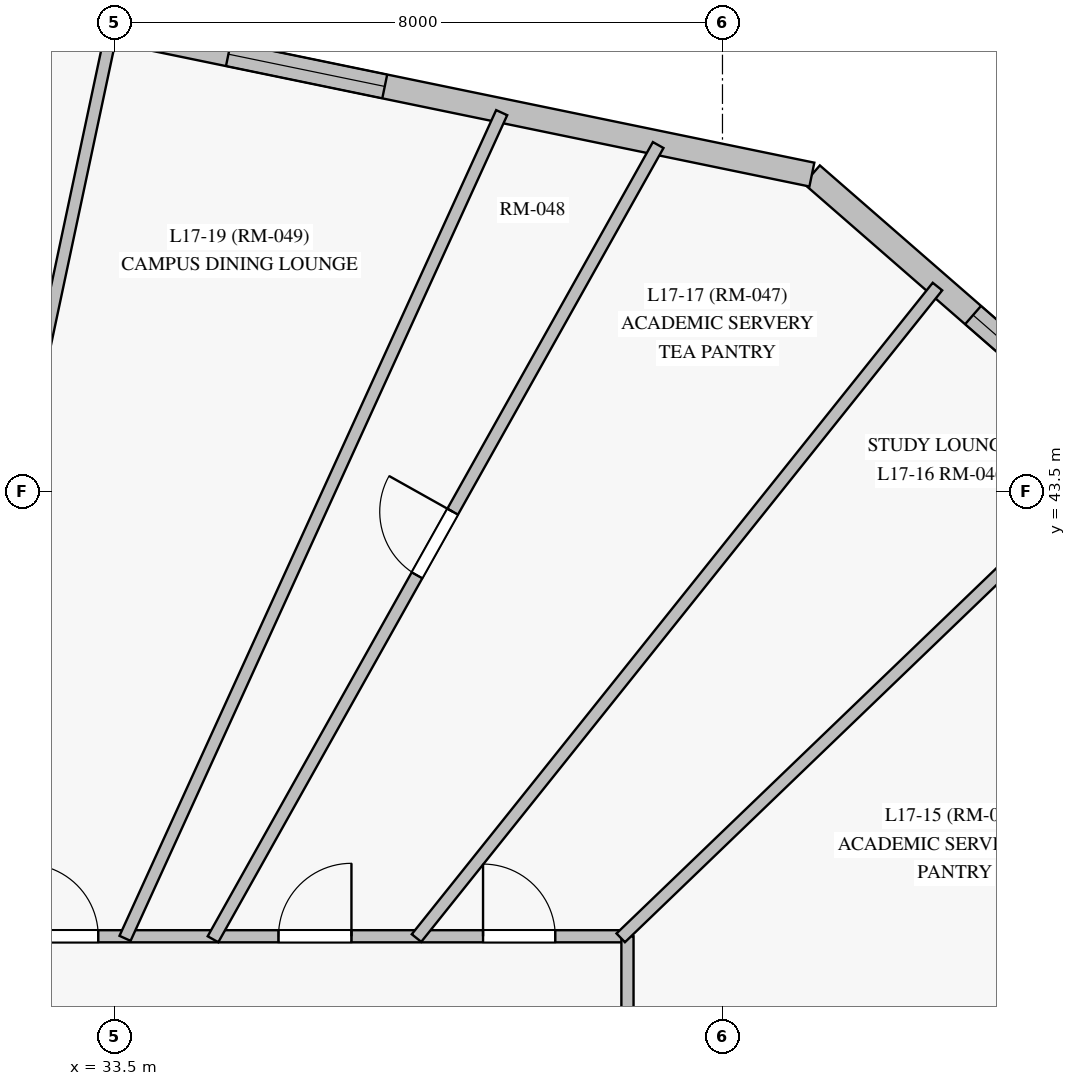
"""IFC4 building model, lengths in metres.
Left out: names, types, materials, properties, quantities, classifications, styles, units other than length and angle.
Written with IfcOpenShell. Run it as: python <this file> out.ifc"""

import sys

from ifc_helpers import new_model, si_unit, direction, frame, frame_2d, origin, origin_with_axes, place, context, subcontext, project, spatial, rectangle, extrude, source, transform, mapped, element, fill, save


model = new_model("IFC4")
c1 = context("Model", 3, precision=1e-05, world=origin(), true_north=direction((0.0, 1.0)))
c2 = subcontext(c1, "Body", "Model", "MODEL_VIEW")
j1 = project(units=[si_unit("LENGTHUNIT", "METRE"), si_unit("PLANEANGLEUNIT", "RADIAN")], contexts=[c1])
p1 = place(None, origin())
s1 = spatial("IfcSite", under=j1, at=p1, CompositionType="ELEMENT")
p2 = place(p1, origin())
s2 = spatial("IfcBuilding", under=s1, at=p2, CompositionType="ELEMENT")
p3 = place(p2, frame((0.0, 0.0, 66.1)))
s3 = spatial("IfcBuildingStorey", under=s2, at=p3, CompositionType="ELEMENT", Elevation=66.1)
p4 = place(p3, frame((48.243, 42.82, 0.0), z_axis=(0.0, 0.0, 1.0), x_axis=(-0.753916755465, 0.656969958087, 0.0)))
e1 = element("IfcWall", 1, at=p4, inside=s3, PredefinedType="SOLIDWALL", context=c2, shape_type="SweptSolid", body=[
    extrude(rectangle(XDim=7.384, YDim=0.32, at=frame_2d((3.692, 0.0))), origin(), (0.0, 0.0, 1.0), 3.02),
])
p5 = place(p4, frame((2.47, 0.0, 0.85)))
e2 = element("IfcOpeningElement", 2, at=p5, cuts=e1, PredefinedType="OPENING", context=c2, shape_type="SweptSolid", body=[
    extrude(rectangle(XDim=2.1, YDim=1.95, at=frame_2d((1.05, 0.975))), frame((0.0, 0.17, 0.0), z_axis=(0.0, -1.0, 0.0), x_axis=(1.0, 0.0, 0.0)), (0.0, 0.0, 1.0), 0.34),
])
p6 = place(p3, frame((42.676, 47.671, 0.0), z_axis=(0.0, 0.0, 1.0), x_axis=(-0.979362200274, 0.20211303935, 0.0)))
e3 = element("IfcWall", 3, at=p6, inside=s3, PredefinedType="SOLIDWALL", context=c2, shape_type="SweptSolid", body=[
    extrude(rectangle(XDim=10.195, YDim=0.32, at=frame_2d((5.098, 0.0))), origin(), (0.0, 0.0, 1.0), 3.35),
])
p7 = place(p6, frame((5.738, 0.0, 0.85)))
e4 = element("IfcOpeningElement", 4, at=p7, cuts=e3, PredefinedType="OPENING", context=c2, shape_type="SweptSolid", body=[
    extrude(rectangle(XDim=2.1, YDim=1.95, at=frame_2d((1.05, 0.975))), frame((0.0, 0.17, 0.0), z_axis=(0.0, -1.0, 0.0), x_axis=(1.0, 0.0, 0.0)), (0.0, 0.0, 1.0), 0.34),
])
p8 = place(p3, frame((32.691, 49.731, 0.0), z_axis=(0.0, 0.0, 1.0), x_axis=(-0.973494178879, -0.228711791759, 0.0)))
e5 = element("IfcWall", 5, at=p8, inside=s3, PredefinedType="SOLIDWALL", context=c2, shape_type="SweptSolid", body=[
    extrude(rectangle(XDim=14.791, YDim=0.32, at=frame_2d((7.396, 0.0))), origin(), (0.0, 0.0, 1.0), 3.35),
])
p9 = place(p8, frame((2.057, 0.0, 0.85)))
e6 = element("IfcOpeningElement", 6, at=p9, cuts=e5, PredefinedType="OPENING", context=c2, shape_type="SweptSolid", body=[
    extrude(rectangle(XDim=2.1, YDim=1.95, at=frame_2d((1.05, 0.975))), frame((0.0, 0.17, 0.0), z_axis=(0.0, -1.0, 0.0), x_axis=(1.0, 0.0, 0.0)), (0.0, 0.0, 1.0), 0.34),
])
p10 = place(p8, frame((7.215, 0.0, 0.85)))
e7 = element("IfcOpeningElement", 7, at=p10, cuts=e5, PredefinedType="OPENING", context=c2, shape_type="SweptSolid", body=[
    extrude(rectangle(XDim=2.1, YDim=1.95, at=frame_2d((1.05, 0.975))), frame((0.0, 0.17, 0.0), z_axis=(0.0, -1.0, 0.0), x_axis=(1.0, 0.0, 0.0)), (0.0, 0.0, 1.0), 0.34),
])
p11 = place(p8, frame((11.26, 0.0, 0.85)))
e8 = element("IfcOpeningElement", 8, at=p11, cuts=e5, PredefinedType="OPENING", context=c2, shape_type="SweptSolid", body=[
    extrude(rectangle(XDim=2.1, YDim=1.95, at=frame_2d((1.05, 0.975))), frame((0.0, 0.17, 0.0), z_axis=(0.0, -1.0, 0.0), x_axis=(1.0, 0.0, 0.0)), (0.0, 0.0, 1.0), 0.34),
])
p12 = place(p3, frame((10.5, 37.65, 0.0), z_axis=(0.0, 0.0, 1.0), x_axis=(1.0, 0.0, 0.0)))
e9 = element("IfcWall", 9, at=p12, inside=s3, PredefinedType="PARTITIONING", context=c2, shape_type="SweptSolid", body=[
    extrude(rectangle(XDim=29.75, YDim=0.16, at=frame_2d((14.875, 0.0))), origin(), (0.0, 0.0, 1.0), 2.75),
])
p13 = place(p12, frame((27.85, 0.0, 0.0)))
e10 = element("IfcOpeningElement", 10, at=p13, cuts=e9, PredefinedType="OPENING", context=c2, shape_type="SweptSolid", body=[
    extrude(rectangle(XDim=0.95, YDim=2.15, at=frame_2d((0.475, 1.075))), frame((0.0, 0.09, 0.0), z_axis=(0.0, -1.0, 0.0), x_axis=(1.0, 0.0, 0.0)), (0.0, 0.0, 1.0), 0.18),
])
p14 = place(p12, frame((25.159, 0.0, 0.0)))
e11 = element("IfcOpeningElement", 11, at=p14, cuts=e9, PredefinedType="OPENING", context=c2, shape_type="SweptSolid", body=[
    extrude(rectangle(XDim=0.96, YDim=2.15, at=frame_2d((0.48, 1.075))), frame((0.0, 0.09, 0.0), z_axis=(0.0, -1.0, 0.0), x_axis=(1.0, 0.0, 0.0)), (0.0, 0.0, 1.0), 0.18),
])
p15 = place(p12, frame((21.837, 0.0, 0.0)))
e12 = element("IfcOpeningElement", 12, at=p15, cuts=e9, PredefinedType="OPENING", context=c2, shape_type="SweptSolid", body=[
    extrude(rectangle(XDim=0.95, YDim=2.15, at=frame_2d((0.475, 1.075))), frame((0.0, 0.09, 0.0), z_axis=(0.0, -1.0, 0.0), x_axis=(1.0, 0.0, 0.0)), (0.0, 0.0, 1.0), 0.18),
])
p16 = place(p12, frame((18.863, 0.0, 0.0)))
e13 = element("IfcOpeningElement", 13, at=p16, cuts=e9, PredefinedType="OPENING", context=c2, shape_type="SweptSolid", body=[
    extrude(rectangle(XDim=0.95, YDim=2.15, at=frame_2d((0.475, 1.075))), frame((0.0, 0.09, 0.0), z_axis=(0.0, -1.0, 0.0), x_axis=(1.0, 0.0, 0.0)), (0.0, 0.0, 1.0), 0.18),
])
p17 = place(p12, frame((15.14, 0.0, 0.0)))
e14 = element("IfcOpeningElement", 14, at=p17, cuts=e9, PredefinedType="OPENING", context=c2, shape_type="SweptSolid", body=[
    extrude(rectangle(XDim=0.96, YDim=2.15, at=frame_2d((0.48, 1.075))), frame((0.0, 0.09, 0.0), z_axis=(0.0, -1.0, 0.0), x_axis=(1.0, 0.0, 0.0)), (0.0, 0.0, 1.0), 0.18),
])
p18 = place(p12, frame((13.176, 0.0, 0.0)))
e15 = element("IfcOpeningElement", 15, at=p18, cuts=e9, PredefinedType="OPENING", context=c2, shape_type="SweptSolid", body=[
    extrude(rectangle(XDim=0.95, YDim=2.15, at=frame_2d((0.475, 1.075))), frame((0.0, 0.09, 0.0), z_axis=(0.0, -1.0, 0.0), x_axis=(1.0, 0.0, 0.0)), (0.0, 0.0, 1.0), 0.18),
])
p19 = place(p12, frame((9.938, 0.0, 0.0)))
e16 = element("IfcOpeningElement", 16, at=p19, cuts=e9, PredefinedType="OPENING", context=c2, shape_type="SweptSolid", body=[
    extrude(rectangle(XDim=0.95, YDim=2.15, at=frame_2d((0.475, 1.075))), frame((0.0, 0.09, 0.0), z_axis=(0.0, -1.0, 0.0), x_axis=(1.0, 0.0, 0.0)), (0.0, 0.0, 1.0), 0.18),
])
p20 = place(p3, frame((40.25, 37.65, 0.0), z_axis=(0.0, 0.0, 1.0), x_axis=(0.0, -1.0, 0.0)))
e17 = element("IfcWall", 17, at=p20, inside=s3, PredefinedType="PARTITIONING", context=c2, shape_type="SweptSolid", body=[
    extrude(rectangle(XDim=22.3, YDim=0.16, at=frame_2d((11.15, 0.0))), origin(), (0.0, 0.0, 1.0), 2.75),
])
p21 = place(p20, frame((14.02, 0.0, 0.0)))
e18 = element("IfcOpeningElement", 18, at=p21, cuts=e17, PredefinedType="OPENING", context=c2, shape_type="SweptSolid", body=[
    extrude(rectangle(XDim=0.95, YDim=2.15, at=frame_2d((0.475, 1.075))), frame((0.0, 0.09, 0.0), z_axis=(0.0, -1.0, 0.0), x_axis=(1.0, 0.0, 0.0)), (0.0, 0.0, 1.0), 0.18),
])
p22 = place(p20, frame((10.675, 0.0, 0.0)))
e19 = element("IfcOpeningElement", 19, at=p22, cuts=e17, PredefinedType="OPENING", context=c2, shape_type="SweptSolid", body=[
    extrude(rectangle(XDim=0.96, YDim=2.15, at=frame_2d((0.48, 1.075))), frame((0.0, 0.09, 0.0), z_axis=(0.0, -1.0, 0.0), x_axis=(1.0, 0.0, 0.0)), (0.0, 0.0, 1.0), 0.18),
])
p23 = place(p20, frame((7.04, 0.0, 0.0)))
e20 = element("IfcOpeningElement", 20, at=p23, cuts=e17, PredefinedType="OPENING", context=c2, shape_type="SweptSolid", body=[
    extrude(rectangle(XDim=0.95, YDim=2.15, at=frame_2d((0.475, 1.075))), frame((0.0, 0.09, 0.0), z_axis=(0.0, -1.0, 0.0), x_axis=(1.0, 0.0, 0.0)), (0.0, 0.0, 1.0), 0.18),
])
p24 = place(p20, frame((3.01, 0.0, 0.0)))
e21 = element("IfcOpeningElement", 21, at=p24, cuts=e17, PredefinedType="OPENING", context=c2, shape_type="SweptSolid", body=[
    extrude(rectangle(XDim=0.96, YDim=2.15, at=frame_2d((0.48, 1.075))), frame((0.0, 0.09, 0.0), z_axis=(0.0, -1.0, 0.0), x_axis=(1.0, 0.0, 0.0)), (0.0, 0.0, 1.0), 0.18),
])
p25 = place(p20, frame((1.651, 0.0, 0.0)))
e22 = element("IfcOpeningElement", 22, at=p25, cuts=e17, PredefinedType="OPENING", context=c2, shape_type="SweptSolid", body=[
    extrude(rectangle(XDim=0.96, YDim=2.15, at=frame_2d((0.48, 1.075))), frame((0.0, 0.09, 0.0), z_axis=(0.0, -1.0, 0.0), x_axis=(1.0, 0.0, 0.0)), (0.0, 0.0, 1.0), 0.18),
])
p26 = place(p3, frame((30.921, 37.606, 0.0), z_axis=(0.0, 0.0, 1.0), x_axis=(0.207881716817, 0.978153971424, 0.0)))
e23 = element("IfcWall", 23, at=p26, inside=s3, PredefinedType="PARTITIONING", context=c2, shape_type="SweptSolid", body=[
    extrude(rectangle(XDim=12.208, YDim=0.16, at=frame_2d((6.104, 0.0))), origin(), (0.0, 0.0, 1.0), 3.35),
])
p27 = place(p3, frame((34.797, 37.611, 0.0), z_axis=(0.0, 0.0, 1.0), x_axis=(0.488977567901, 0.872296359094, 0.0)))
e24 = element("IfcWall", 24, at=p27, inside=s3, PredefinedType="PARTITIONING", context=c2, shape_type="SweptSolid", body=[
    extrude(rectangle(XDim=11.979, YDim=0.16, at=frame_2d((5.989, 0.0))), origin(), (0.0, 0.0, 1.0), 3.35),
])
p28 = place(p27, frame((5.489, 0.0, 0.0)))
e25 = element("IfcOpeningElement", 25, at=p28, cuts=e24, PredefinedType="OPENING", context=c2, shape_type="SweptSolid", body=[
    extrude(rectangle(XDim=0.96, YDim=2.15, at=frame_2d((0.48, 1.075))), frame((0.0, 0.09, 0.0), z_axis=(0.0, -1.0, 0.0), x_axis=(1.0, 0.0, 0.0)), (0.0, 0.0, 1.0), 0.18),
])
p29 = place(p3, frame((33.64, 37.623, 0.0), z_axis=(0.0, 0.0, 1.0), x_axis=(0.41503042051, 0.90980753462, 0.0)))
e26 = element("IfcWall", 26, at=p29, inside=s3, PredefinedType="PARTITIONING", context=c2, shape_type="SweptSolid", body=[
    extrude(rectangle(XDim=11.94, YDim=0.16, at=frame_2d((5.97, 0.0))), origin(), (0.0, 0.0, 1.0), 3.35),
])
p30 = place(p3, frame((37.475, 37.627, 0.0), z_axis=(0.0, 0.0, 1.0), x_axis=(0.62453496585, 0.780996847901, 0.0)))
e27 = element("IfcWall", 27, at=p30, inside=s3, PredefinedType="PARTITIONING", context=c2, shape_type="SweptSolid", body=[
    extrude(rectangle(XDim=10.974, YDim=0.16, at=frame_2d((5.487, 0.0))), origin(), (0.0, 0.0, 1.0), 3.35),
])
p31 = place(p3, frame((40.211, 33.113, 0.0), z_axis=(0.0, 0.0, 1.0), x_axis=(0.868569695906, 0.49556703215, 0.0)))
e28 = element("IfcWall", 28, at=p31, inside=s3, PredefinedType="PARTITIONING", context=c2, shape_type="SweptSolid", body=[
    extrude(rectangle(XDim=9.886, YDim=0.16, at=frame_2d((4.943, 0.0))), origin(), (0.0, 0.0, 1.0), 3.35),
])
p32 = place(p31, frame((4.513, 0.0, 0.0)))
e29 = element("IfcOpeningElement", 29, at=p32, cuts=e28, PredefinedType="OPENING", context=c2, shape_type="SweptSolid", body=[
    extrude(rectangle(XDim=0.86, YDim=2.04, at=frame_2d((0.43, 1.02))), frame((0.0, 0.09, 0.0), z_axis=(0.0, -1.0, 0.0), x_axis=(1.0, 0.0, 0.0)), (0.0, 0.0, 1.0), 0.18),
])
p33 = place(p3, frame((40.161, 37.629, 0.0), z_axis=(0.0, 0.0, 1.0), x_axis=(0.720839161992, 0.693102375222, 0.0)))
e30 = element("IfcWall", 30, at=p33, inside=s3, PredefinedType="PARTITIONING", context=c2, shape_type="SweptSolid", body=[
    extrude(rectangle(XDim=9.233, YDim=0.16, at=frame_2d((4.617, 0.0))), origin(), (0.0, 0.0, 1.0), 3.35),
])
m1 = source(origin_with_axes(), c2, "Body", "SweptSolid", [
    extrude(rectangle(XDim=2.1, YDim=1.95, at=frame_2d((1.05, 0.975))), frame((0.0, 0.03, 0.0), z_axis=(0.0, -1.0, 0.0), x_axis=(1.0, 0.0, 0.0)), (0.0, 0.0, 1.0), 0.06),
])
p34 = place(p5, origin())
e31 = element("IfcWindow", 31, at=p34, inside=s3, PartitioningType="SINGLE_PANEL", PredefinedType="WINDOW", context=c2, shape_type="MappedRepresentation", body=[
    mapped(m1, transform((0.0, 0.0, 0.0), scale=1.0)),
])
fill(e2, e31)
p35 = place(p7, origin())
e32 = element("IfcWindow", 32, at=p35, inside=s3, PartitioningType="SINGLE_PANEL", PredefinedType="WINDOW", context=c2, shape_type="MappedRepresentation", body=[
    mapped(m1, transform((0.0, 0.0, 0.0), scale=1.0)),
])
fill(e4, e32)
m2 = source(origin_with_axes(), c2, "Body", "SweptSolid", [
    extrude(rectangle(XDim=0.95, YDim=2.15, at=frame_2d((0.475, 1.075))), frame((0.0, 0.025, 0.0), z_axis=(0.0, -1.0, 0.0), x_axis=(1.0, 0.0, 0.0)), (0.0, 0.0, 1.0), 0.05),
])
p36 = place(p13, origin())
e33 = element("IfcDoor", 33, at=p36, inside=s3, OperationType="SINGLE_SWING_LEFT", PredefinedType="DOOR", context=c2, shape_type="MappedRepresentation", body=[
    mapped(m2, transform((0.0, 0.0, 0.0), scale=1.0)),
])
fill(e10, e33)
m3 = source(origin_with_axes(), c2, "Body", "SweptSolid", [
    extrude(rectangle(XDim=0.96, YDim=2.15, at=frame_2d((0.48, 1.075))), frame((0.0, 0.025, 0.0), z_axis=(0.0, -1.0, 0.0), x_axis=(1.0, 0.0, 0.0)), (0.0, 0.0, 1.0), 0.05),
])
p37 = place(p14, origin())
e34 = element("IfcDoor", 34, at=p37, inside=s3, OperationType="SINGLE_SWING_RIGHT", PredefinedType="DOOR", context=c2, shape_type="MappedRepresentation", body=[
    mapped(m3, transform((0.0, 0.0, 0.0), scale=1.0)),
])
fill(e11, e34)
p38 = place(p15, origin())
e35 = element("IfcDoor", 35, at=p38, inside=s3, OperationType="SINGLE_SWING_LEFT", PredefinedType="DOOR", context=c2, shape_type="MappedRepresentation", body=[
    mapped(m2, transform((0.0, 0.0, 0.0), scale=1.0)),
])
fill(e12, e35)
p39 = place(p28, origin())
e36 = element("IfcDoor", 36, at=p39, inside=s3, OperationType="SINGLE_SWING_RIGHT", PredefinedType="DOOR", context=c2, shape_type="MappedRepresentation", body=[
    mapped(m3, transform((0.0, 0.0, 0.0), scale=1.0)),
])
fill(e25, e36)
save(model, sys.argv[1])
